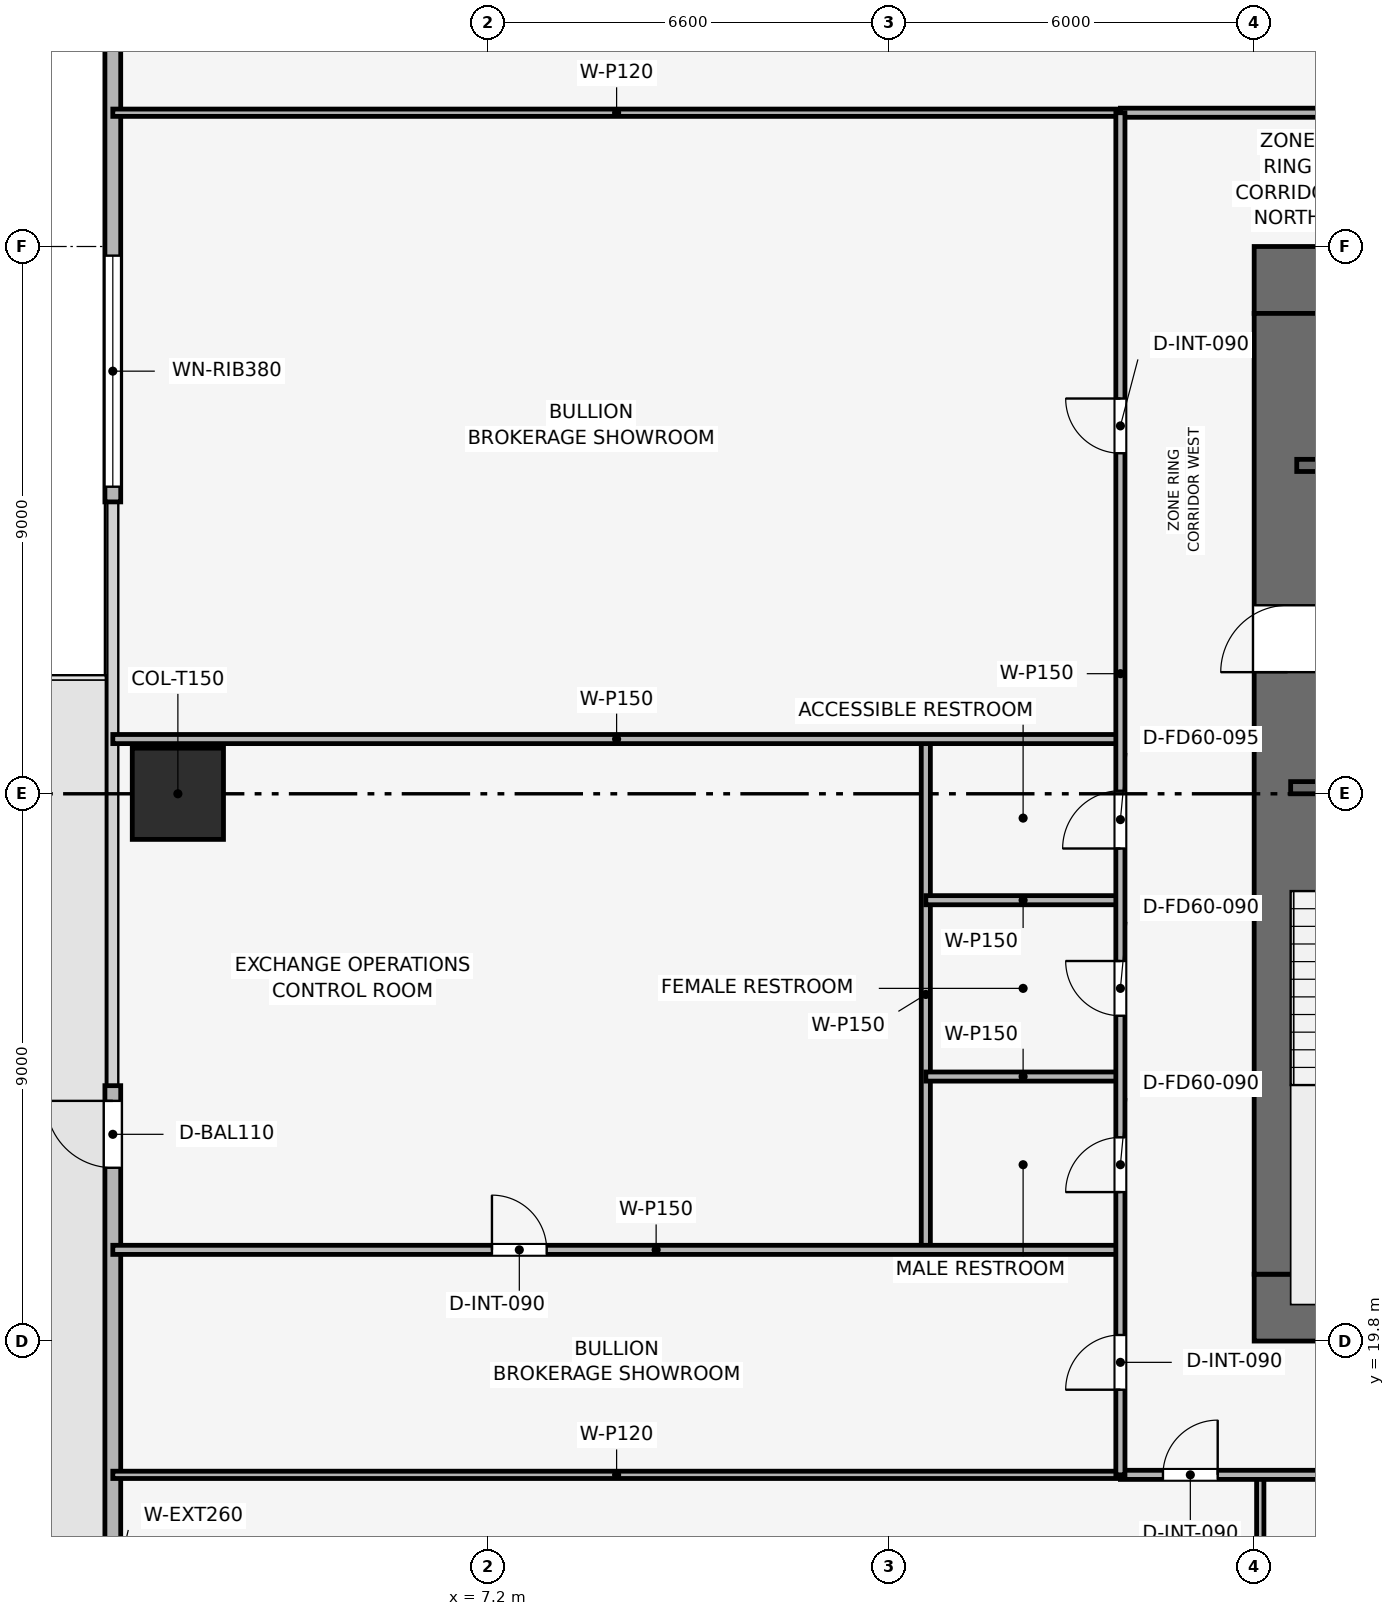
"""IFC4 building model, lengths in metres.
Left out: names, types, materials, properties, quantities, classifications, styles, units other than length and angle.
Written with IfcOpenShell. Run it as: python <this file> out.ifc"""

import sys

from ifc_helpers import new_model, si_unit, direction, frame, frame_2d, origin, origin_2d, place, context, subcontext, project, spatial, rectangle, extrude, element, fill, save


model = new_model("IFC4")
c1 = context("Model", 3, precision=1e-05, world=origin(), true_north=direction((0.0, 1.0)))
c2 = subcontext(c1, "Body", "Model", "MODEL_VIEW")
j1 = project(units=[si_unit("LENGTHUNIT", "METRE"), si_unit("PLANEANGLEUNIT", "RADIAN")], contexts=[c1])
p1 = place(None, origin())
s1 = spatial("IfcSite", under=j1, at=p1, CompositionType="ELEMENT")
p2 = place(p1, origin())
s2 = spatial("IfcBuilding", under=s1, at=p2, CompositionType="ELEMENT")
p3 = place(p2, frame((0.0, 0.0, 49.5)))
s3 = spatial("IfcBuildingStorey", under=s2, at=p3, CompositionType="ELEMENT", Elevation=49.5)
p4 = place(p3, frame((19.8, 20.35, 0.0), z_axis=(0.0, 0.0, 1.0), x_axis=(1.0, 0.0, 0.0)))
e1 = element("IfcWall", 1, at=p4, inside=s3, PredefinedType="SHEAR", context=c2, shape_type="SweptSolid", body=[
    extrude(rectangle(XDim=18.0, YDim=1.1, at=frame_2d((9.0, 0.0))), origin(), (0.0, 0.0, 1.0), 3.9),
])
p5 = place(p4, frame((8.4, 0.0, 0.0)))
e2 = element("IfcOpeningElement", 2, at=p5, cuts=e1, PredefinedType="OPENING", context=c2, shape_type="SweptSolid", body=[
    extrude(rectangle(XDim=1.2, YDim=2.2, at=frame_2d((0.6, 1.1))), frame((0.0, 0.56, 0.0), z_axis=(0.0, -1.0, 0.0), x_axis=(1.0, 0.0, 0.0)), (0.0, 0.0, 1.0), 1.12),
])
p6 = place(p3, frame((19.8, 37.25, 0.0), z_axis=(0.0, 0.0, 1.0), x_axis=(1.0, 0.0, 0.0)))
e3 = element("IfcWall", 3, at=p6, inside=s3, PredefinedType="SHEAR", context=c2, shape_type="SweptSolid", body=[
    extrude(rectangle(XDim=18.0, YDim=1.1, at=frame_2d((9.0, 0.0))), origin(), (0.0, 0.0, 1.0), 3.9),
])
p7 = place(p6, frame((7.05, 0.0, 0.0)))
e4 = element("IfcOpeningElement", 4, at=p7, cuts=e3, PredefinedType="OPENING", context=c2, shape_type="SweptSolid", body=[
    extrude(rectangle(XDim=1.1, YDim=2.15, at=frame_2d((0.55, 1.075))), frame((0.0, 0.56, 0.0), z_axis=(0.0, -1.0, 0.0), x_axis=(1.0, 0.0, 0.0)), (0.0, 0.0, 1.0), 1.12),
])
p8 = place(p3, frame((20.35, 20.9, 0.0), z_axis=(0.0, 0.0, 1.0), x_axis=(0.0, 1.0, 0.0)))
e5 = element("IfcWall", 5, at=p8, inside=s3, PredefinedType="SHEAR", context=c2, shape_type="SweptSolid", body=[
    extrude(rectangle(XDim=15.8, YDim=1.1, at=frame_2d((7.9, 0.0))), origin(), (0.0, 0.0, 1.0), 3.9),
])
p9 = place(p8, frame((9.9, 0.0, 0.0)))
e6 = element("IfcOpeningElement", 6, at=p9, cuts=e5, PredefinedType="OPENING", context=c2, shape_type="SweptSolid", body=[
    extrude(rectangle(XDim=1.1, YDim=2.15, at=frame_2d((0.55, 1.075))), frame((0.0, 0.56, 0.0), z_axis=(0.0, -1.0, 0.0), x_axis=(1.0, 0.0, 0.0)), (0.0, 0.0, 1.0), 1.12),
])
p10 = place(p3, frame((2.1, 28.8, 0.003), z_axis=(0.0, 0.0, 1.0), x_axis=(1.0, 0.0, 0.0)))
e7 = element("IfcColumn", 7, at=p10, inside=s3, PredefinedType="COLUMN", context=c2, shape_type="SweptSolid", body=[
    extrude(rectangle(XDim=1.5, YDim=1.5, at=origin_2d()), origin(), (0.0, 0.0, 1.0), 3.644),
])
p11 = place(p3, frame((1.03, 8.7, 0.0), z_axis=(0.0, 0.0, 1.0), x_axis=(0.0, 1.0, 0.0)))
e8 = element("IfcWall", 8, at=p11, inside=s3, PredefinedType="SOLIDWALL", context=c2, shape_type="SweptSolid", body=[
    extrude(rectangle(XDim=15.3, YDim=0.26, at=frame_2d((7.65, 0.0))), origin(), (0.0, 0.0, 1.0), 3.65),
])
p12 = place(p11, frame((13.95, 0.0, 0.0)))
e9 = element("IfcOpeningElement", 9, at=p12, cuts=e8, PredefinedType="OPENING", context=c2, shape_type="SweptSolid", body=[
    extrude(rectangle(XDim=1.1, YDim=2.2, at=frame_2d((0.55, 1.1))), frame((0.0, 0.14, 0.0), z_axis=(0.0, -1.0, 0.0), x_axis=(1.0, 0.0, 0.0)), (0.0, 0.0, 1.0), 0.28),
])
p13 = place(p3, frame((1.03, 33.6, 0.0), z_axis=(0.0, 0.0, 1.0), x_axis=(0.0, 1.0, 0.0)))
e10 = element("IfcWall", 10, at=p13, inside=s3, PredefinedType="SOLIDWALL", context=c2, shape_type="SweptSolid", body=[
    extrude(rectangle(XDim=15.3, YDim=0.26, at=frame_2d((7.65, 0.0))), origin(), (0.0, 0.0, 1.0), 3.65),
])
p14 = place(p13, frame((0.25, 0.0, 0.9)))
e11 = element("IfcOpeningElement", 11, at=p14, cuts=e10, PredefinedType="OPENING", context=c2, shape_type="SweptSolid", body=[
    extrude(rectangle(XDim=3.8, YDim=1.9, at=frame_2d((1.9, 0.95))), frame((0.0, 0.14, 0.0), z_axis=(0.0, -1.0, 0.0), x_axis=(1.0, 0.0, 0.0)), (0.0, 0.0, 1.0), 0.28),
])
p15 = place(p3, frame((20.4, 28.9, 0.0), z_axis=(0.0, 0.0, 1.0), x_axis=(1.0, 0.0, 0.0)))
e12 = element("IfcWall", 12, at=p15, inside=s3, PredefinedType="SHEAR", context=c2, shape_type="SweptSolid", body=[
    extrude(rectangle(XDim=3.15, YDim=0.2, at=frame_2d((1.575, 0.0))), origin(), (0.0, 0.0, 1.0), 3.65),
])
p16 = place(p15, frame((0.8, 0.0, 0.0)))
e13 = element("IfcOpeningElement", 13, at=p16, cuts=e12, PredefinedType="OPENING", context=c2, shape_type="SweptSolid", body=[
    extrude(rectangle(XDim=1.0, YDim=2.1, at=frame_2d((0.5, 1.05))), frame((0.0, 0.11, 0.0), z_axis=(0.0, -1.0, 0.0), x_axis=(1.0, 0.0, 0.0)), (0.0, 0.0, 1.0), 0.22),
])
p17 = place(p3, frame((20.5, 34.2, 0.0), z_axis=(0.0, 0.0, 1.0), x_axis=(1.0, 0.0, 0.0)))
e14 = element("IfcWall", 14, at=p17, inside=s3, PredefinedType="SHEAR", context=c2, shape_type="SweptSolid", body=[
    extrude(rectangle(XDim=3.05, YDim=0.2, at=frame_2d((1.525, 0.0))), origin(), (0.0, 0.0, 1.0), 3.65),
])
p18 = place(p17, frame((0.75, 0.0, 0.0)))
e15 = element("IfcOpeningElement", 15, at=p18, cuts=e14, PredefinedType="OPENING", context=c2, shape_type="SweptSolid", body=[
    extrude(rectangle(XDim=1.1, YDim=2.15, at=frame_2d((0.55, 1.075))), frame((0.0, 0.11, 0.0), z_axis=(0.0, -1.0, 0.0), x_axis=(1.0, 0.0, 0.0)), (0.0, 0.0, 1.0), 0.22),
])
for number, where, z_axis, x_axis in (
    (16, (19.9, 1.03, 0.0), (0.0, 0.0, 1.0), (0.0, 1.0, 0.0)),
    (17, (1.03, 17.6, 0.0), (0.0, 0.0, 1.0), (1.0, 0.0, 0.0)),
    (18, (1.03, 40.0, 0.0), (0.0, 0.0, 1.0), (1.0, 0.0, 0.0)),
):
    element("IfcWall", number, at=place(p3, frame(where, z_axis=z_axis, x_axis=x_axis)), inside=s3, PredefinedType="PARTITIONING", context=c2, shape_type="SweptSolid", body=[
        extrude(rectangle(XDim=16.57, YDim=0.12, at=frame_2d((8.285, 0.0))), origin(), (0.0, 0.0, 1.0), 2.935),
    ])
p19 = place(p3, frame((14.4, 21.3, 0.0), z_axis=(0.0, 0.0, 1.0), x_axis=(0.0, 1.0, 0.0)))
e19 = element("IfcWall", 19, at=p19, inside=s3, PredefinedType="PARTITIONING", context=c2, shape_type="SweptSolid", body=[
    extrude(rectangle(XDim=8.4, YDim=0.15, at=frame_2d((4.2, 0.0))), origin(), (0.0, 0.0, 1.0), 3.085),
])
p20 = place(p3, frame((1.03, 21.3, 0.0), z_axis=(0.0, 0.0, 1.0), x_axis=(1.0, 0.0, 0.0)))
e20 = element("IfcWall", 20, at=p20, inside=s3, PredefinedType="PARTITIONING", context=c2, shape_type="SweptSolid", body=[
    extrude(rectangle(XDim=16.57, YDim=0.15, at=frame_2d((8.285, 0.0))), origin(), (0.0, 0.0, 1.0), 2.935),
])
p21 = place(p20, frame((6.235, 0.0, 0.0)))
e21 = element("IfcOpeningElement", 21, at=p21, cuts=e20, PredefinedType="OPENING", context=c2, shape_type="SweptSolid", body=[
    extrude(rectangle(XDim=0.9, YDim=2.1, at=frame_2d((0.45, 1.05))), frame((0.0, 0.085, 0.0), z_axis=(0.0, -1.0, 0.0), x_axis=(1.0, 0.0, 0.0)), (0.0, 0.0, 1.0), 0.17),
])
p22 = place(p3, frame((1.03, 29.7, 0.0), z_axis=(0.0, 0.0, 1.0), x_axis=(1.0, 0.0, 0.0)))
e22 = element("IfcWall", 22, at=p22, inside=s3, PredefinedType="PARTITIONING", context=c2, shape_type="SweptSolid", body=[
    extrude(rectangle(XDim=16.57, YDim=0.15, at=frame_2d((8.285, 0.0))), origin(), (0.0, 0.0, 1.0), 2.935),
])
for number, where, z_axis, x_axis in (
    (23, (14.4, 24.15, 0.0), (0.0, 0.0, 1.0), (1.0, 0.0, 0.0)),
    (24, (14.4, 27.05, 0.0), (0.0, 0.0, 1.0), (1.0, 0.0, 0.0)),
):
    element("IfcWall", number, at=place(p3, frame(where, z_axis=z_axis, x_axis=x_axis)), inside=s3, PredefinedType="PARTITIONING", context=c2, shape_type="SweptSolid", body=[
        extrude(rectangle(XDim=3.2, YDim=0.15, at=frame_2d((1.6, 0.0))), origin(), (0.0, 0.0, 1.0), 3.65),
    ])
p23 = place(p3, frame((17.6, 17.6, 0.0), z_axis=(0.0, 0.0, 1.0), x_axis=(1.0, 0.0, 0.0)))
e25 = element("IfcWall", 25, at=p23, inside=s3, PredefinedType="PARTITIONING", context=c2, shape_type="SweptSolid", body=[
    extrude(rectangle(XDim=22.4, YDim=0.15, at=frame_2d((11.2, 0.0))), origin(), (0.0, 0.0, 1.0), 3.085),
])
p24 = place(p23, frame((0.7, 0.0, 0.0)))
e26 = element("IfcOpeningElement", 26, at=p24, cuts=e25, PredefinedType="OPENING", context=c2, shape_type="SweptSolid", body=[
    extrude(rectangle(XDim=0.9, YDim=2.1, at=frame_2d((0.45, 1.05))), frame((0.0, 0.085, 0.0), z_axis=(0.0, -1.0, 0.0), x_axis=(1.0, 0.0, 0.0)), (0.0, 0.0, 1.0), 0.17),
])
p25 = place(p23, frame((6.352, 0.0, 0.0)))
e27 = element("IfcOpeningElement", 27, at=p25, cuts=e25, PredefinedType="OPENING", context=c2, shape_type="SweptSolid", body=[
    extrude(rectangle(XDim=0.9, YDim=2.1, at=frame_2d((0.45, 1.05))), frame((0.0, 0.085, 0.0), z_axis=(0.0, -1.0, 0.0), x_axis=(1.0, 0.0, 0.0)), (0.0, 0.0, 1.0), 0.17),
])
p26 = place(p23, frame((16.402, 0.0, 0.0)))
e28 = element("IfcOpeningElement", 28, at=p26, cuts=e25, PredefinedType="OPENING", context=c2, shape_type="SweptSolid", body=[
    extrude(rectangle(XDim=0.9, YDim=2.1, at=frame_2d((0.45, 1.05))), frame((0.0, 0.085, 0.0), z_axis=(0.0, -1.0, 0.0), x_axis=(1.0, 0.0, 0.0)), (0.0, 0.0, 1.0), 0.17),
])
p27 = place(p3, frame((17.6, 40.0, 0.0), z_axis=(0.0, 0.0, 1.0), x_axis=(1.0, 0.0, 0.0)))
e29 = element("IfcWall", 29, at=p27, inside=s3, PredefinedType="PARTITIONING", context=c2, shape_type="SweptSolid", body=[
    extrude(rectangle(XDim=22.4, YDim=0.15, at=frame_2d((11.2, 0.0))), origin(), (0.0, 0.0, 1.0), 3.085),
])
p28 = place(p27, frame((4.438, 0.0, 0.0)))
e30 = element("IfcOpeningElement", 30, at=p28, cuts=e29, PredefinedType="OPENING", context=c2, shape_type="SweptSolid", body=[
    extrude(rectangle(XDim=0.9, YDim=2.1, at=frame_2d((0.45, 1.05))), frame((0.0, 0.085, 0.0), z_axis=(0.0, -1.0, 0.0), x_axis=(1.0, 0.0, 0.0)), (0.0, 0.0, 1.0), 0.17),
])
p29 = place(p27, frame((15.638, 0.0, 0.0)))
e31 = element("IfcOpeningElement", 31, at=p29, cuts=e29, PredefinedType="OPENING", context=c2, shape_type="SweptSolid", body=[
    extrude(rectangle(XDim=0.9, YDim=2.1, at=frame_2d((0.45, 1.05))), frame((0.0, 0.085, 0.0), z_axis=(0.0, -1.0, 0.0), x_axis=(1.0, 0.0, 0.0)), (0.0, 0.0, 1.0), 0.17),
])
p30 = place(p3, frame((17.6, 17.6, 0.0), z_axis=(0.0, 0.0, 1.0), x_axis=(0.0, 1.0, 0.0)))
e32 = element("IfcWall", 32, at=p30, inside=s3, PredefinedType="PARTITIONING", context=c2, shape_type="SweptSolid", body=[
    extrude(rectangle(XDim=22.4, YDim=0.15, at=frame_2d((11.2, 0.0))), origin(), (0.0, 0.0, 1.0), 3.085),
])
p31 = place(p30, frame((1.4, 0.0, 0.0)))
e33 = element("IfcOpeningElement", 33, at=p31, cuts=e32, PredefinedType="OPENING", context=c2, shape_type="SweptSolid", body=[
    extrude(rectangle(XDim=0.9, YDim=2.1, at=frame_2d((0.45, 1.05))), frame((0.0, 0.085, 0.0), z_axis=(0.0, -1.0, 0.0), x_axis=(1.0, 0.0, 0.0)), (0.0, 0.0, 1.0), 0.17),
])
p32 = place(p30, frame((4.65, 0.0, 0.0)))
e34 = element("IfcOpeningElement", 34, at=p32, cuts=e32, PredefinedType="OPENING", context=c2, shape_type="SweptSolid", body=[
    extrude(rectangle(XDim=0.9, YDim=2.1, at=frame_2d((0.45, 1.05))), frame((0.0, 0.085, 0.0), z_axis=(0.0, -1.0, 0.0), x_axis=(1.0, 0.0, 0.0)), (0.0, 0.0, 1.0), 0.17),
])
p33 = place(p30, frame((7.55, 0.0, 0.0)))
e35 = element("IfcOpeningElement", 35, at=p33, cuts=e32, PredefinedType="OPENING", context=c2, shape_type="SweptSolid", body=[
    extrude(rectangle(XDim=0.9, YDim=2.1, at=frame_2d((0.45, 1.05))), frame((0.0, 0.085, 0.0), z_axis=(0.0, -1.0, 0.0), x_axis=(1.0, 0.0, 0.0)), (0.0, 0.0, 1.0), 0.17),
])
p34 = place(p30, frame((10.3, 0.0, 0.0)))
e36 = element("IfcOpeningElement", 36, at=p34, cuts=e32, PredefinedType="OPENING", context=c2, shape_type="SweptSolid", body=[
    extrude(rectangle(XDim=0.95, YDim=2.1, at=frame_2d((0.475, 1.05))), frame((0.0, 0.085, 0.0), z_axis=(0.0, -1.0, 0.0), x_axis=(1.0, 0.0, 0.0)), (0.0, 0.0, 1.0), 0.17),
])
p35 = place(p30, frame((16.8, 0.0, 0.0)))
e37 = element("IfcOpeningElement", 37, at=p35, cuts=e32, PredefinedType="OPENING", context=c2, shape_type="SweptSolid", body=[
    extrude(rectangle(XDim=0.9, YDim=2.1, at=frame_2d((0.45, 1.05))), frame((0.0, 0.085, 0.0), z_axis=(0.0, -1.0, 0.0), x_axis=(1.0, 0.0, 0.0)), (0.0, 0.0, 1.0), 0.17),
])
p36 = place(p12, origin())
e38 = element("IfcDoor", 38, at=p36, inside=s3, OperationType="SINGLE_SWING_RIGHT", PredefinedType="DOOR", context=c2, shape_type="SweptSolid", body=[
    extrude(rectangle(XDim=1.1, YDim=2.2, at=frame_2d((0.55, 1.1))), frame((0.0, 0.025, 0.0), z_axis=(0.0, -1.0, 0.0), x_axis=(1.0, 0.0, 0.0)), (0.0, 0.0, 1.0), 0.05),
])
fill(e9, e38)
p37 = place(p14, origin())
e39 = element("IfcWindow", 39, at=p37, inside=s3, PartitioningType="SINGLE_PANEL", PredefinedType="WINDOW", context=c2, shape_type="SweptSolid", body=[
    extrude(rectangle(XDim=3.8, YDim=1.9, at=frame_2d((1.9, 0.95))), frame((0.0, 0.03, 0.0), z_axis=(0.0, -1.0, 0.0), x_axis=(1.0, 0.0, 0.0)), (0.0, 0.0, 1.0), 0.06),
])
fill(e11, e39)
p38 = place(p21, origin())
e40 = element("IfcDoor", 40, at=p38, inside=s3, OperationType="SINGLE_SWING_LEFT", PredefinedType="DOOR", context=c2, shape_type="SweptSolid", body=[
    extrude(rectangle(XDim=0.9, YDim=2.1, at=frame_2d((0.45, 1.05))), frame((0.0, 0.025, 0.0), z_axis=(0.0, -1.0, 0.0), x_axis=(1.0, 0.0, 0.0)), (0.0, 0.0, 1.0), 0.05),
])
fill(e21, e40)
p39 = place(p24, origin())
e41 = element("IfcDoor", 41, at=p39, inside=s3, OperationType="SINGLE_SWING_RIGHT", PredefinedType="DOOR", context=c2, shape_type="SweptSolid", body=[
    extrude(rectangle(XDim=0.9, YDim=2.1, at=frame_2d((0.45, 1.05))), frame((0.0, 0.025, 0.0), z_axis=(0.0, -1.0, 0.0), x_axis=(1.0, 0.0, 0.0)), (0.0, 0.0, 1.0), 0.05),
])
fill(e26, e41)
p40 = place(p31, origin())
e42 = element("IfcDoor", 42, at=p40, inside=s3, OperationType="SINGLE_SWING_LEFT", PredefinedType="DOOR", context=c2, shape_type="SweptSolid", body=[
    extrude(rectangle(XDim=0.9, YDim=2.1, at=frame_2d((0.45, 1.05))), frame((0.0, 0.025, 0.0), z_axis=(0.0, -1.0, 0.0), x_axis=(1.0, 0.0, 0.0)), (0.0, 0.0, 1.0), 0.05),
])
fill(e33, e42)
p41 = place(p32, origin())
e43 = element("IfcDoor", 43, at=p41, inside=s3, OperationType="SINGLE_SWING_LEFT", PredefinedType="DOOR", context=c2, shape_type="SweptSolid", body=[
    extrude(rectangle(XDim=0.9, YDim=2.1, at=frame_2d((0.45, 1.05))), frame((0.0, 0.025, 0.0), z_axis=(0.0, -1.0, 0.0), x_axis=(1.0, 0.0, 0.0)), (0.0, 0.0, 1.0), 0.05),
])
fill(e34, e43)
p42 = place(p33, origin())
e44 = element("IfcDoor", 44, at=p42, inside=s3, OperationType="SINGLE_SWING_RIGHT", PredefinedType="DOOR", context=c2, shape_type="SweptSolid", body=[
    extrude(rectangle(XDim=0.9, YDim=2.1, at=frame_2d((0.45, 1.05))), frame((0.0, 0.025, 0.0), z_axis=(0.0, -1.0, 0.0), x_axis=(1.0, 0.0, 0.0)), (0.0, 0.0, 1.0), 0.05),
])
fill(e35, e44)
p43 = place(p34, origin())
e45 = element("IfcDoor", 45, at=p43, inside=s3, OperationType="SINGLE_SWING_LEFT", PredefinedType="DOOR", context=c2, shape_type="SweptSolid", body=[
    extrude(rectangle(XDim=0.95, YDim=2.1, at=frame_2d((0.475, 1.05))), frame((0.0, 0.025, 0.0), z_axis=(0.0, -1.0, 0.0), x_axis=(1.0, 0.0, 0.0)), (0.0, 0.0, 1.0), 0.05),
])
fill(e36, e45)
p44 = place(p35, origin())
e46 = element("IfcDoor", 46, at=p44, inside=s3, OperationType="SINGLE_SWING_RIGHT", PredefinedType="DOOR", context=c2, shape_type="SweptSolid", body=[
    extrude(rectangle(XDim=0.9, YDim=2.1, at=frame_2d((0.45, 1.05))), frame((0.0, 0.025, 0.0), z_axis=(0.0, -1.0, 0.0), x_axis=(1.0, 0.0, 0.0)), (0.0, 0.0, 1.0), 0.05),
])
fill(e37, e46)
p45 = place(p9, origin())
e47 = element("IfcDoor", 47, at=p45, inside=s3, OperationType="SINGLE_SWING_LEFT", PredefinedType="DOOR", context=c2, shape_type="SweptSolid", body=[
    extrude(rectangle(XDim=1.1, YDim=2.15, at=frame_2d((0.55, 1.075))), frame((0.0, 0.025, 0.0), z_axis=(0.0, -1.0, 0.0), x_axis=(1.0, 0.0, 0.0)), (0.0, 0.0, 1.0), 0.05),
])
fill(e6, e47)
save(model, sys.argv[1])
